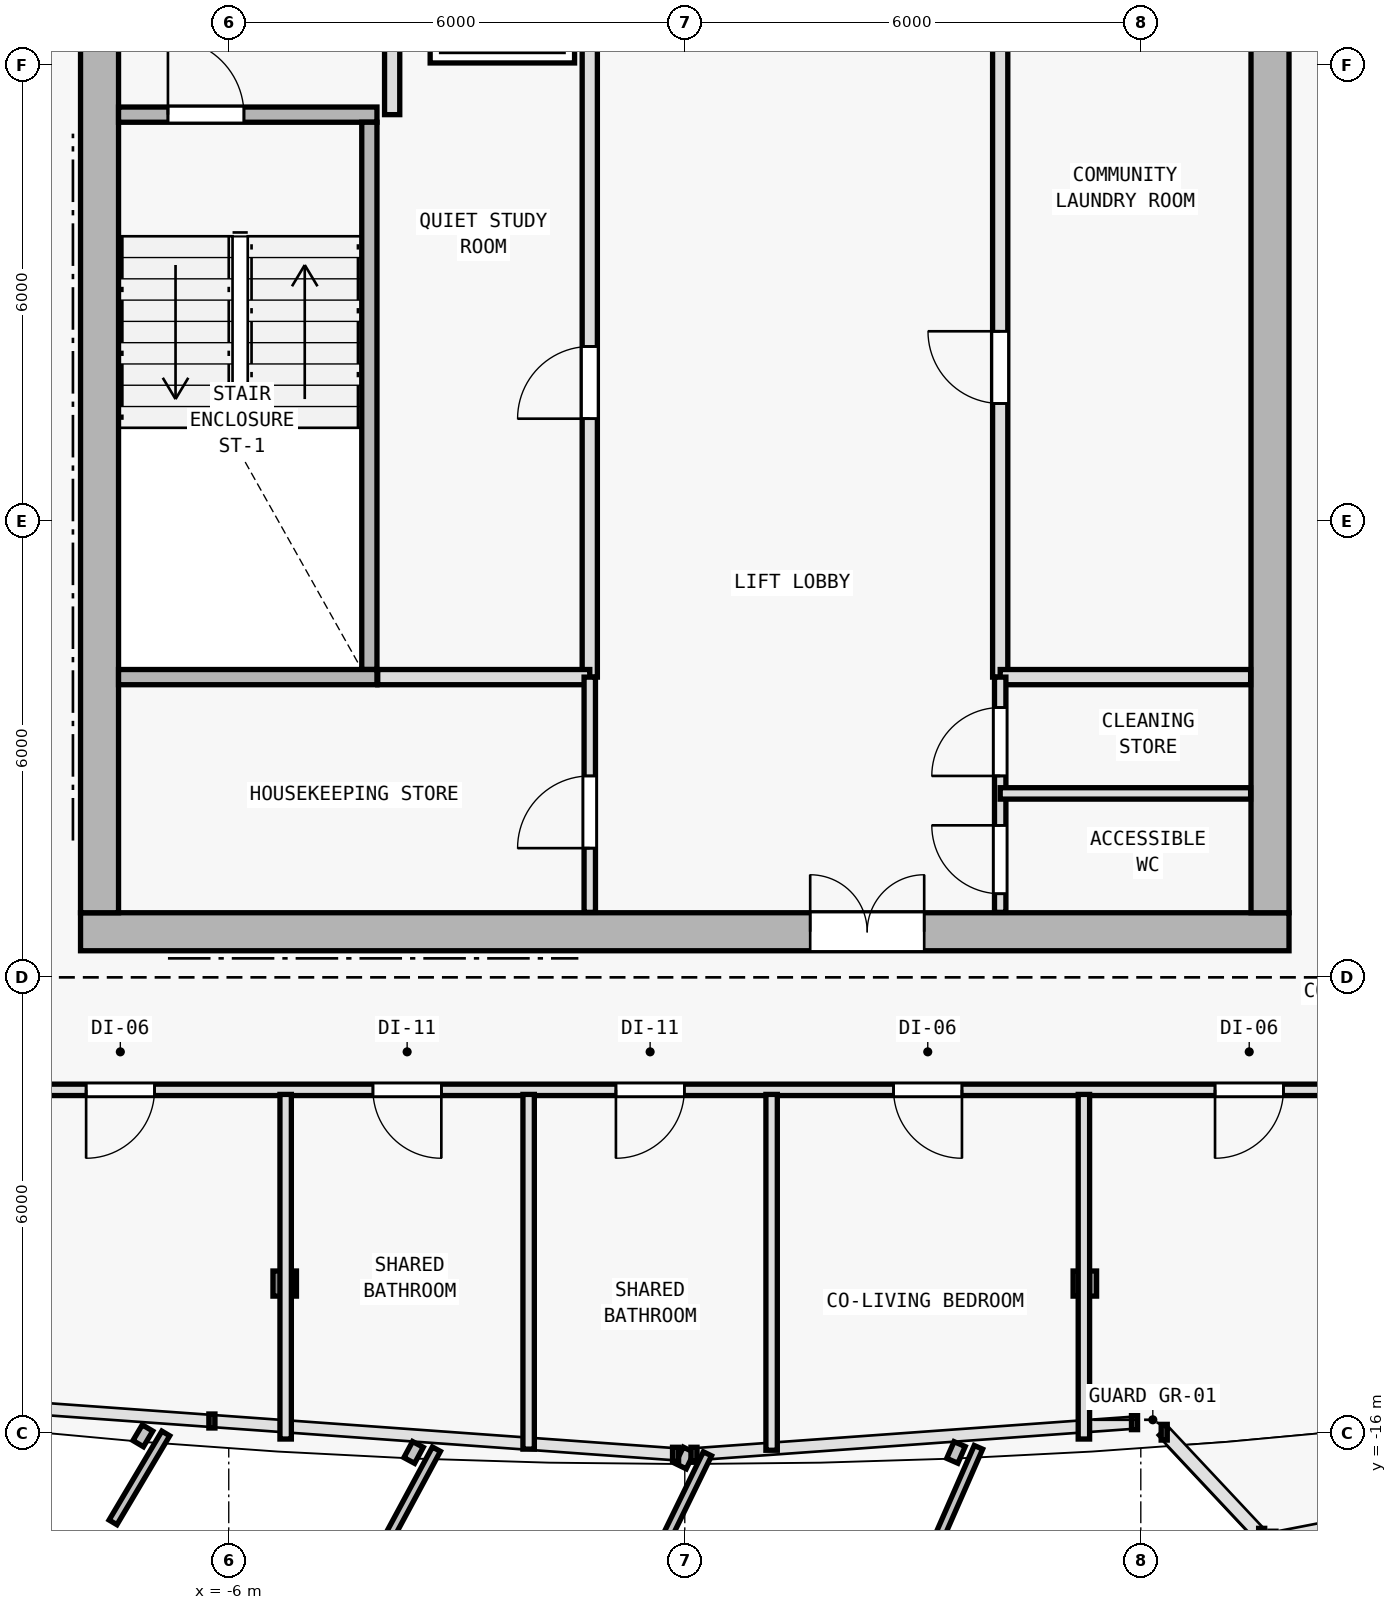
"""IFC4 building model, lengths in metres.
Left out: names, types, materials, properties, quantities, classifications, styles, units other than length and angle.
Written with IfcOpenShell. Run it as: python <this file> out.ifc"""

import sys

from ifc_helpers import new_model, si_unit, direction, frame, frame_2d, origin, origin_2d, place, context, subcontext, project, spatial, rectangle, i_section, extrude, element, fill, save


model = new_model("IFC4")
c1 = context("Model", 3, precision=1e-05, world=origin(), true_north=direction((0.0, 1.0)))
c2 = subcontext(c1, "Body", "Model", "MODEL_VIEW")
j1 = project(units=[si_unit("LENGTHUNIT", "METRE"), si_unit("PLANEANGLEUNIT", "RADIAN")], contexts=[c1])
p1 = place(None, origin())
s1 = spatial("IfcSite", under=j1, at=p1, CompositionType="ELEMENT")
p2 = place(p1, origin())
s2 = spatial("IfcBuilding", under=s1, at=p2, CompositionType="ELEMENT")
p3 = place(p2, frame((0.0, 0.0, 261.6)))
s3 = spatial("IfcBuildingStorey", under=s2, at=p3, CompositionType="ELEMENT", Elevation=261.6)
for number, where, z_axis, x_axis in (
    (1, (-7.7, -9.4, 0.0), (0.0, 0.0, 1.0), (1.0, 0.0, 0.0)),
    (2, (7.7, -9.4, 0.0), (0.0, 0.0, 1.0), (1.0, 0.0, 0.0)),
    (3, (0.0, -9.4, 0.0), (0.0, 0.0, 1.0), (1.0, 0.0, 0.0)),
    (4, (7.7, 0.4, 0.0), (0.0, 0.0, 1.0), (1.0, 0.0, 0.0)),
    (5, (-7.7, 2.0, 0.0), (0.0, 0.0, 1.0), (1.0, 0.0, 0.0)),
):
    element("IfcColumn", number, at=place(p3, frame(where, z_axis=z_axis, x_axis=x_axis)), inside=s3, PredefinedType="COLUMN", context=c2, shape_type="SweptSolid", body=[
        extrude(i_section(OverallWidth=0.374, OverallDepth=0.372, WebThickness=0.012, FlangeThickness=0.02, FilletRadius=0.015, at=origin_2d()), origin(), (0.0, 0.0, 1.0), 3.6),
    ])
for number, where, z_axis, x_axis in (
    (6, (-5.264, -14.028, 0.005), (0.007, 0.035, 0.999), (-0.982, 0.191, 0.0)),
    (7, (5.264, -14.028, 0.005), (-0.007, 0.035, 0.999), (-0.982, -0.191, 0.0)),
):
    element("IfcColumn", number, at=place(p3, frame(where, z_axis=z_axis, x_axis=x_axis)), inside=s3, PredefinedType="COLUMN", context=c2, shape_type="SweptSolid", body=[
        extrude(i_section(OverallWidth=0.309, OverallDepth=0.33, WebThickness=0.011, FlangeThickness=0.019, FilletRadius=0.027, at=origin_2d()), origin(), (0.0, 0.0, 1.0), 3.591),
    ])
p4 = place(p3, frame((-7.95, -9.4, 0.0), z_axis=(0.0, 0.0, 1.0), x_axis=(1.0, 0.0, 0.0)))
e8 = element("IfcWall", 8, at=p4, inside=s3, PredefinedType="SHEAR", context=c2, shape_type="SweptSolid", body=[
    extrude(rectangle(XDim=15.9, YDim=0.5, at=frame_2d((7.95, 0.0))), origin(), (0.0, 0.0, 1.0), 3.35),
])
p5 = place(p4, frame((9.6, 0.0, 0.0)))
e9 = element("IfcOpeningElement", 9, at=p5, cuts=e8, PredefinedType="OPENING", context=c2, shape_type="SweptSolid", body=[
    extrude(rectangle(XDim=1.5, YDim=2.2, at=frame_2d((0.75, 1.1))), frame((0.0, 0.26, 0.0), z_axis=(0.0, -1.0, 0.0), x_axis=(1.0, 0.0, 0.0)), (0.0, 0.0, 1.0), 0.52),
])
p6 = place(p3, frame((-7.7, -9.15, 0.0), z_axis=(0.0, 0.0, 1.0), x_axis=(0.0, 1.0, 0.0)))
e10 = element("IfcWall", 10, at=p6, inside=s3, PredefinedType="SHEAR", context=c2, shape_type="SweptSolid", body=[
    extrude(rectangle(XDim=19.1, YDim=0.5, at=frame_2d((9.55, 0.0))), origin(), (0.0, 0.0, 1.0), 3.35),
])
p7 = place(p6, frame((12.7, 0.0, 0.0)))
e11 = element("IfcOpeningElement", 11, at=p7, cuts=e10, PredefinedType="OPENING", context=c2, shape_type="SweptSolid", body=[
    extrude(rectangle(XDim=1.1, YDim=2.15, at=frame_2d((0.55, 1.075))), frame((0.0, 0.26, 0.0), z_axis=(0.0, -1.0, 0.0), x_axis=(1.0, 0.0, 0.0)), (0.0, 0.0, 1.0), 0.52),
])
p8 = place(p3, frame((7.7, 9.95, 0.0), z_axis=(0.0, 0.0, 1.0), x_axis=(0.0, -1.0, 0.0)))
e12 = element("IfcWall", 12, at=p8, inside=s3, PredefinedType="SHEAR", context=c2, shape_type="SweptSolid", body=[
    extrude(rectangle(XDim=19.1, YDim=0.5, at=frame_2d((9.55, 0.0))), origin(), (0.0, 0.0, 1.0), 3.35),
])
p9 = place(p3, frame((-7.45, 1.35, 0.0), z_axis=(0.0, 0.0, 1.0), x_axis=(1.0, 0.0, 0.0)))
e13 = element("IfcWall", 13, at=p9, inside=s3, PredefinedType="SOLIDWALL", context=c2, shape_type="SweptSolid", body=[
    extrude(rectangle(XDim=3.4, YDim=0.2, at=frame_2d((1.7, 0.0))), origin(), (0.0, 0.0, 1.0), 3.35),
])
p10 = place(p9, frame((0.65, 0.0, 0.0)))
e14 = element("IfcOpeningElement", 14, at=p10, cuts=e13, PredefinedType="OPENING", context=c2, shape_type="SweptSolid", body=[
    extrude(rectangle(XDim=1.0, YDim=2.15, at=frame_2d((0.5, 1.075))), frame((0.0, 0.11, 0.0), z_axis=(0.0, -1.0, 0.0), x_axis=(1.0, 0.0, 0.0)), (0.0, 0.0, 1.0), 0.22),
])
p11 = place(p3, frame((-4.15, -5.95, 0.0), z_axis=(0.0, 0.0, 1.0), x_axis=(0.0, 1.0, 0.0)))
e15 = element("IfcWall", 15, at=p11, inside=s3, PredefinedType="SOLIDWALL", context=c2, shape_type="SweptSolid", body=[
    extrude(rectangle(XDim=7.2, YDim=0.2, at=frame_2d((3.6, 0.0))), origin(), (0.0, 0.0, 1.0), 3.35),
])
p12 = place(p3, frame((-3.85, 1.35, 0.0), z_axis=(0.0, 0.0, 1.0), x_axis=(0.0, 1.0, 0.0)))
e16 = element("IfcWall", 16, at=p12, inside=s3, PredefinedType="SOLIDWALL", context=c2, shape_type="SweptSolid", body=[
    extrude(rectangle(XDim=8.595, YDim=0.2, at=frame_2d((4.297, 0.0))), origin(), (0.0, 0.0, 1.0), 3.35),
])
p13 = place(p12, frame((1.5, 0.0, 0.0)))
e17 = element("IfcOpeningElement", 17, at=p13, cuts=e16, PredefinedType="OPENING", context=c2, shape_type="SweptSolid", body=[
    extrude(rectangle(XDim=1.0, YDim=2.15, at=frame_2d((0.5, 1.075))), frame((0.0, 0.11, 0.0), z_axis=(0.0, -1.0, 0.0), x_axis=(1.0, 0.0, 0.0)), (0.0, 0.0, 1.0), 0.22),
])
p14 = place(p12, frame((3.18, 0.0, 0.0)))
e18 = element("IfcOpeningElement", 18, at=p14, cuts=e16, PredefinedType="OPENING", context=c2, shape_type="SweptSolid", body=[
    extrude(rectangle(XDim=1.0, YDim=2.15, at=frame_2d((0.5, 1.075))), frame((0.0, 0.11, 0.0), z_axis=(0.0, -1.0, 0.0), x_axis=(1.0, 0.0, 0.0)), (0.0, 0.0, 1.0), 0.22),
])
p15 = place(p3, frame((4.15, -6.05, 0.0), z_axis=(0.0, 0.0, 1.0), x_axis=(0.0, 1.0, 0.0)))
e19 = element("IfcWall", 19, at=p15, inside=s3, PredefinedType="SOLIDWALL", context=c2, shape_type="SweptSolid", body=[
    extrude(rectangle(XDim=8.7, YDim=0.2, at=frame_2d((4.35, 0.0))), origin(), (0.0, 0.0, 1.0), 3.35),
])
p16 = place(p15, frame((3.6, 0.0, 0.0)))
e20 = element("IfcOpeningElement", 20, at=p16, cuts=e19, PredefinedType="OPENING", context=c2, shape_type="SweptSolid", body=[
    extrude(rectangle(XDim=0.95, YDim=2.1, at=frame_2d((0.475, 1.05))), frame((0.0, 0.11, 0.0), z_axis=(0.0, -1.0, 0.0), x_axis=(1.0, 0.0, 0.0)), (0.0, 0.0, 1.0), 0.22),
])
p17 = place(p3, frame((-1.25, -6.05, 0.0), z_axis=(0.0, 0.0, 1.0), x_axis=(0.0, 1.0, 0.0)))
e21 = element("IfcWall", 21, at=p17, inside=s3, PredefinedType="SOLIDWALL", context=c2, shape_type="SweptSolid", body=[
    extrude(rectangle(XDim=8.7, YDim=0.2, at=frame_2d((4.35, 0.0))), origin(), (0.0, 0.0, 1.0), 3.35),
])
p18 = place(p17, frame((3.4, 0.0, 0.0)))
e22 = element("IfcOpeningElement", 22, at=p18, cuts=e21, PredefinedType="OPENING", context=c2, shape_type="SweptSolid", body=[
    extrude(rectangle(XDim=0.95, YDim=2.1, at=frame_2d((0.475, 1.05))), frame((0.0, 0.11, 0.0), z_axis=(0.0, -1.0, 0.0), x_axis=(1.0, 0.0, 0.0)), (0.0, 0.0, 1.0), 0.22),
])
p19 = place(p3, frame((-7.45, -6.05, 0.0), z_axis=(0.0, 0.0, 1.0), x_axis=(1.0, 0.0, 0.0)))
e23 = element("IfcWall", 23, at=p19, inside=s3, PredefinedType="SOLIDWALL", context=c2, shape_type="SweptSolid", body=[
    extrude(rectangle(XDim=3.4, YDim=0.2, at=frame_2d((1.7, 0.0))), origin(), (0.0, 0.0, 1.0), 3.35),
])
p20 = place(p3, frame((-4.04, -6.05, 0.0), z_axis=(0.0, 0.0, 1.0), x_axis=(1.0, 0.0, 0.0)))
e24 = element("IfcWall", 24, at=p20, inside=s3, PredefinedType="SOLIDWALL", context=c2, shape_type="SweptSolid", body=[
    extrude(rectangle(XDim=2.79, YDim=0.2, at=frame_2d((1.395, 0.0))), origin(), (0.0, 0.0, 1.0), 3.35),
])
p21 = place(p3, frame((4.15, -6.05, 0.0), z_axis=(0.0, 0.0, 1.0), x_axis=(1.0, 0.0, 0.0)))
e25 = element("IfcWall", 25, at=p21, inside=s3, PredefinedType="SOLIDWALL", context=c2, shape_type="SweptSolid", body=[
    extrude(rectangle(XDim=3.295, YDim=0.2, at=frame_2d((1.647, 0.0))), origin(), (0.0, 0.0, 1.0), 3.35),
])
p22 = place(p3, frame((-1.25, -9.145, 0.0), z_axis=(0.0, 0.0, 1.0), x_axis=(0.0, 1.0, 0.0)))
e26 = element("IfcWall", 26, at=p22, inside=s3, PredefinedType="PARTITIONING", context=c2, shape_type="SweptSolid", body=[
    extrude(rectangle(XDim=3.095, YDim=0.15, at=frame_2d((1.547, 0.0))), origin(), (0.0, 0.0, 1.0), 3.35),
])
p23 = place(p22, frame((0.845, 0.0, 0.0)))
e27 = element("IfcOpeningElement", 27, at=p23, cuts=e26, PredefinedType="OPENING", context=c2, shape_type="SweptSolid", body=[
    extrude(rectangle(XDim=0.95, YDim=2.1, at=frame_2d((0.475, 1.05))), frame((0.0, 0.085, 0.0), z_axis=(0.0, -1.0, 0.0), x_axis=(1.0, 0.0, 0.0)), (0.0, 0.0, 1.0), 0.17),
])
p24 = place(p3, frame((4.15, -9.145, 0.0), z_axis=(0.0, 0.0, 1.0), x_axis=(0.0, 1.0, 0.0)))
e28 = element("IfcWall", 28, at=p24, inside=s3, PredefinedType="PARTITIONING", context=c2, shape_type="SweptSolid", body=[
    extrude(rectangle(XDim=3.095, YDim=0.15, at=frame_2d((1.547, 0.0))), origin(), (0.0, 0.0, 1.0), 3.35),
])
p25 = place(p24, frame((0.245, 0.0, 0.0)))
e29 = element("IfcOpeningElement", 29, at=p25, cuts=e28, PredefinedType="OPENING", context=c2, shape_type="SweptSolid", body=[
    extrude(rectangle(XDim=0.9, YDim=2.1, at=frame_2d((0.45, 1.05))), frame((0.0, 0.085, 0.0), z_axis=(0.0, -1.0, 0.0), x_axis=(1.0, 0.0, 0.0)), (0.0, 0.0, 1.0), 0.17),
])
p26 = place(p24, frame((1.795, 0.0, 0.0)))
e30 = element("IfcOpeningElement", 30, at=p26, cuts=e28, PredefinedType="OPENING", context=c2, shape_type="SweptSolid", body=[
    extrude(rectangle(XDim=0.9, YDim=2.1, at=frame_2d((0.45, 1.05))), frame((0.0, 0.085, 0.0), z_axis=(0.0, -1.0, 0.0), x_axis=(1.0, 0.0, 0.0)), (0.0, 0.0, 1.0), 0.17),
])
p27 = place(p3, frame((4.15, -7.58, 0.0), z_axis=(0.0, 0.0, 1.0), x_axis=(1.0, 0.0, 0.0)))
e31 = element("IfcWall", 31, at=p27, inside=s3, PredefinedType="PARTITIONING", context=c2, shape_type="SweptSolid", body=[
    extrude(rectangle(XDim=3.295, YDim=0.15, at=frame_2d((1.647, 0.0))), origin(), (0.0, 0.0, 1.0), 3.35),
])
p28 = place(p3, frame((9.78, -11.48, 0.0), z_axis=(0.0, 0.0, 1.0), x_axis=(-1.0, 0.0, 0.0)))
e32 = element("IfcWall", 32, at=p28, inside=s3, PredefinedType="PARTITIONING", context=c2, shape_type="SweptSolid", body=[
    extrude(rectangle(XDim=19.56, YDim=0.15, at=frame_2d((9.78, 0.0))), origin(), (0.0, 0.0, 1.0), 2.725),
])
p29 = place(p28, frame((16.757, 0.0, 0.0)))
e33 = element("IfcOpeningElement", 33, at=p29, cuts=e32, PredefinedType="OPENING", context=c2, shape_type="SweptSolid", body=[
    extrude(rectangle(XDim=0.9, YDim=2.1, at=frame_2d((0.45, 1.05))), frame((0.0, 0.085, 0.0), z_axis=(0.0, -1.0, 0.0), x_axis=(1.0, 0.0, 0.0)), (0.0, 0.0, 1.0), 0.17),
])
p30 = place(p28, frame((12.983, 0.0, 0.0)))
e34 = element("IfcOpeningElement", 34, at=p30, cuts=e32, PredefinedType="OPENING", context=c2, shape_type="SweptSolid", body=[
    extrude(rectangle(XDim=0.9, YDim=2.1, at=frame_2d((0.45, 1.05))), frame((0.0, 0.085, 0.0), z_axis=(0.0, -1.0, 0.0), x_axis=(1.0, 0.0, 0.0)), (0.0, 0.0, 1.0), 0.17),
])
p31 = place(p28, frame((9.786, 0.0, 0.0)))
e35 = element("IfcOpeningElement", 35, at=p31, cuts=e32, PredefinedType="OPENING", context=c2, shape_type="SweptSolid", body=[
    extrude(rectangle(XDim=0.9, YDim=2.1, at=frame_2d((0.45, 1.05))), frame((0.0, 0.085, 0.0), z_axis=(0.0, -1.0, 0.0), x_axis=(1.0, 0.0, 0.0)), (0.0, 0.0, 1.0), 0.17),
])
p32 = place(p28, frame((6.133, 0.0, 0.0)))
e36 = element("IfcOpeningElement", 36, at=p32, cuts=e32, PredefinedType="OPENING", context=c2, shape_type="SweptSolid", body=[
    extrude(rectangle(XDim=0.9, YDim=2.1, at=frame_2d((0.45, 1.05))), frame((0.0, 0.085, 0.0), z_axis=(0.0, -1.0, 0.0), x_axis=(1.0, 0.0, 0.0)), (0.0, 0.0, 1.0), 0.17),
])
p33 = place(p28, frame((1.904, 0.0, 0.0)))
e37 = element("IfcOpeningElement", 37, at=p33, cuts=e32, PredefinedType="OPENING", context=c2, shape_type="SweptSolid", body=[
    extrude(rectangle(XDim=0.9, YDim=2.1, at=frame_2d((0.45, 1.05))), frame((0.0, 0.085, 0.0), z_axis=(0.0, -1.0, 0.0), x_axis=(1.0, 0.0, 0.0)), (0.0, 0.0, 1.0), 0.17),
])
p34 = place(p3, frame((-5.251, -11.54, 0.0), z_axis=(0.0, 0.0, 1.0), x_axis=(0.0, -1.0, 0.0)))
e38 = element("IfcWall", 38, at=p34, inside=s3, PredefinedType="PARTITIONING", context=c2, shape_type="SweptSolid", body=[
    extrude(rectangle(XDim=4.534, YDim=0.15, at=frame_2d((2.267, 0.0))), origin(), (0.0, 0.0, 1.0), 3.015),
])
p35 = place(p3, frame((5.251, -11.54, 0.0), z_axis=(0.0, 0.0, 1.0), x_axis=(0.0, -1.0, 0.0)))
e39 = element("IfcWall", 39, at=p35, inside=s3, PredefinedType="PARTITIONING", context=c2, shape_type="SweptSolid", body=[
    extrude(rectangle(XDim=4.534, YDim=0.15, at=frame_2d((2.267, 0.0))), origin(), (0.0, 0.0, 1.0), 2.775),
])
p36 = place(p3, frame((1.143, -11.54, 0.0), z_axis=(0.0, 0.0, 1.0), x_axis=(0.0, -1.0, 0.0)))
e40 = element("IfcWall", 40, at=p36, inside=s3, PredefinedType="PARTITIONING", context=c2, shape_type="SweptSolid", body=[
    extrude(rectangle(XDim=4.681, YDim=0.15, at=frame_2d((2.341, 0.0))), origin(), (0.0, 0.0, 1.0), 2.725),
])
p37 = place(p3, frame((-2.054, -11.54, 0.0), z_axis=(0.0, 0.0, 1.0), x_axis=(0.0, -1.0, 0.0)))
e41 = element("IfcWall", 41, at=p37, inside=s3, PredefinedType="PARTITIONING", context=c2, shape_type="SweptSolid", body=[
    extrude(rectangle(XDim=4.667, YDim=0.15, at=frame_2d((2.333, 0.0))), origin(), (0.0, 0.0, 1.0), 2.725),
])
p38 = place(p5, origin())
e42 = element("IfcDoor", 42, at=p38, inside=s3, OperationType="DOUBLE_DOOR_SINGLE_SWING", PredefinedType="DOOR", context=c2, shape_type="SweptSolid", body=[
    extrude(rectangle(XDim=1.5, YDim=2.2, at=frame_2d((0.75, 1.1))), frame((0.0, 0.025, 0.0), z_axis=(0.0, -1.0, 0.0), x_axis=(1.0, 0.0, 0.0)), (0.0, 0.0, 1.0), 0.05),
])
fill(e9, e42)
p39 = place(p10, origin())
e43 = element("IfcDoor", 43, at=p39, inside=s3, OperationType="SINGLE_SWING_LEFT", PredefinedType="DOOR", context=c2, shape_type="SweptSolid", body=[
    extrude(rectangle(XDim=1.0, YDim=2.15, at=frame_2d((0.5, 1.075))), frame((0.0, 0.025, 0.0), z_axis=(0.0, -1.0, 0.0), x_axis=(1.0, 0.0, 0.0)), (0.0, 0.0, 1.0), 0.05),
])
fill(e14, e43)
p40 = place(p16, origin())
e44 = element("IfcDoor", 44, at=p40, inside=s3, OperationType="SINGLE_SWING_RIGHT", PredefinedType="DOOR", context=c2, shape_type="SweptSolid", body=[
    extrude(rectangle(XDim=0.95, YDim=2.1, at=frame_2d((0.475, 1.05))), frame((0.0, 0.025, 0.0), z_axis=(0.0, -1.0, 0.0), x_axis=(1.0, 0.0, 0.0)), (0.0, 0.0, 1.0), 0.05),
])
fill(e20, e44)
p41 = place(p18, origin())
e45 = element("IfcDoor", 45, at=p41, inside=s3, OperationType="SINGLE_SWING_LEFT", PredefinedType="DOOR", context=c2, shape_type="SweptSolid", body=[
    extrude(rectangle(XDim=0.95, YDim=2.1, at=frame_2d((0.475, 1.05))), frame((0.0, 0.025, 0.0), z_axis=(0.0, -1.0, 0.0), x_axis=(1.0, 0.0, 0.0)), (0.0, 0.0, 1.0), 0.05),
])
fill(e22, e45)
p42 = place(p23, origin())
e46 = element("IfcDoor", 46, at=p42, inside=s3, OperationType="SINGLE_SWING_LEFT", PredefinedType="DOOR", context=c2, shape_type="SweptSolid", body=[
    extrude(rectangle(XDim=0.95, YDim=2.1, at=frame_2d((0.475, 1.05))), frame((0.0, 0.025, 0.0), z_axis=(0.0, -1.0, 0.0), x_axis=(1.0, 0.0, 0.0)), (0.0, 0.0, 1.0), 0.05),
])
fill(e27, e46)
p43 = place(p25, origin())
e47 = element("IfcDoor", 47, at=p43, inside=s3, OperationType="SINGLE_SWING_RIGHT", PredefinedType="DOOR", context=c2, shape_type="SweptSolid", body=[
    extrude(rectangle(XDim=0.9, YDim=2.1, at=frame_2d((0.45, 1.05))), frame((0.0, 0.025, 0.0), z_axis=(0.0, -1.0, 0.0), x_axis=(1.0, 0.0, 0.0)), (0.0, 0.0, 1.0), 0.05),
])
fill(e29, e47)
p44 = place(p26, origin())
e48 = element("IfcDoor", 48, at=p44, inside=s3, OperationType="SINGLE_SWING_LEFT", PredefinedType="DOOR", context=c2, shape_type="SweptSolid", body=[
    extrude(rectangle(XDim=0.9, YDim=2.1, at=frame_2d((0.45, 1.05))), frame((0.0, 0.025, 0.0), z_axis=(0.0, -1.0, 0.0), x_axis=(1.0, 0.0, 0.0)), (0.0, 0.0, 1.0), 0.05),
])
fill(e30, e48)
p45 = place(p29, origin())
e49 = element("IfcDoor", 49, at=p45, inside=s3, OperationType="SINGLE_SWING_RIGHT", PredefinedType="DOOR", context=c2, shape_type="SweptSolid", body=[
    extrude(rectangle(XDim=0.9, YDim=2.1, at=frame_2d((0.45, 1.05))), frame((0.0, 0.025, 0.0), z_axis=(0.0, -1.0, 0.0), x_axis=(1.0, 0.0, 0.0)), (0.0, 0.0, 1.0), 0.05),
])
fill(e33, e49)
p46 = place(p30, origin())
e50 = element("IfcDoor", 50, at=p46, inside=s3, OperationType="SINGLE_SWING_LEFT", PredefinedType="DOOR", context=c2, shape_type="SweptSolid", body=[
    extrude(rectangle(XDim=0.9, YDim=2.1, at=frame_2d((0.45, 1.05))), frame((0.0, 0.025, 0.0), z_axis=(0.0, -1.0, 0.0), x_axis=(1.0, 0.0, 0.0)), (0.0, 0.0, 1.0), 0.05),
])
fill(e34, e50)
p47 = place(p31, origin())
e51 = element("IfcDoor", 51, at=p47, inside=s3, OperationType="SINGLE_SWING_RIGHT", PredefinedType="DOOR", context=c2, shape_type="SweptSolid", body=[
    extrude(rectangle(XDim=0.9, YDim=2.1, at=frame_2d((0.45, 1.05))), frame((0.0, 0.025, 0.0), z_axis=(0.0, -1.0, 0.0), x_axis=(1.0, 0.0, 0.0)), (0.0, 0.0, 1.0), 0.05),
])
fill(e35, e51)
p48 = place(p32, origin())
e52 = element("IfcDoor", 52, at=p48, inside=s3, OperationType="SINGLE_SWING_LEFT", PredefinedType="DOOR", context=c2, shape_type="SweptSolid", body=[
    extrude(rectangle(XDim=0.9, YDim=2.1, at=frame_2d((0.45, 1.05))), frame((0.0, 0.025, 0.0), z_axis=(0.0, -1.0, 0.0), x_axis=(1.0, 0.0, 0.0)), (0.0, 0.0, 1.0), 0.05),
])
fill(e36, e52)
p49 = place(p33, origin())
e53 = element("IfcDoor", 53, at=p49, inside=s3, OperationType="SINGLE_SWING_RIGHT", PredefinedType="DOOR", context=c2, shape_type="SweptSolid", body=[
    extrude(rectangle(XDim=0.9, YDim=2.1, at=frame_2d((0.45, 1.05))), frame((0.0, 0.025, 0.0), z_axis=(0.0, -1.0, 0.0), x_axis=(1.0, 0.0, 0.0)), (0.0, 0.0, 1.0), 0.05),
])
fill(e37, e53)
save(model, sys.argv[1])
